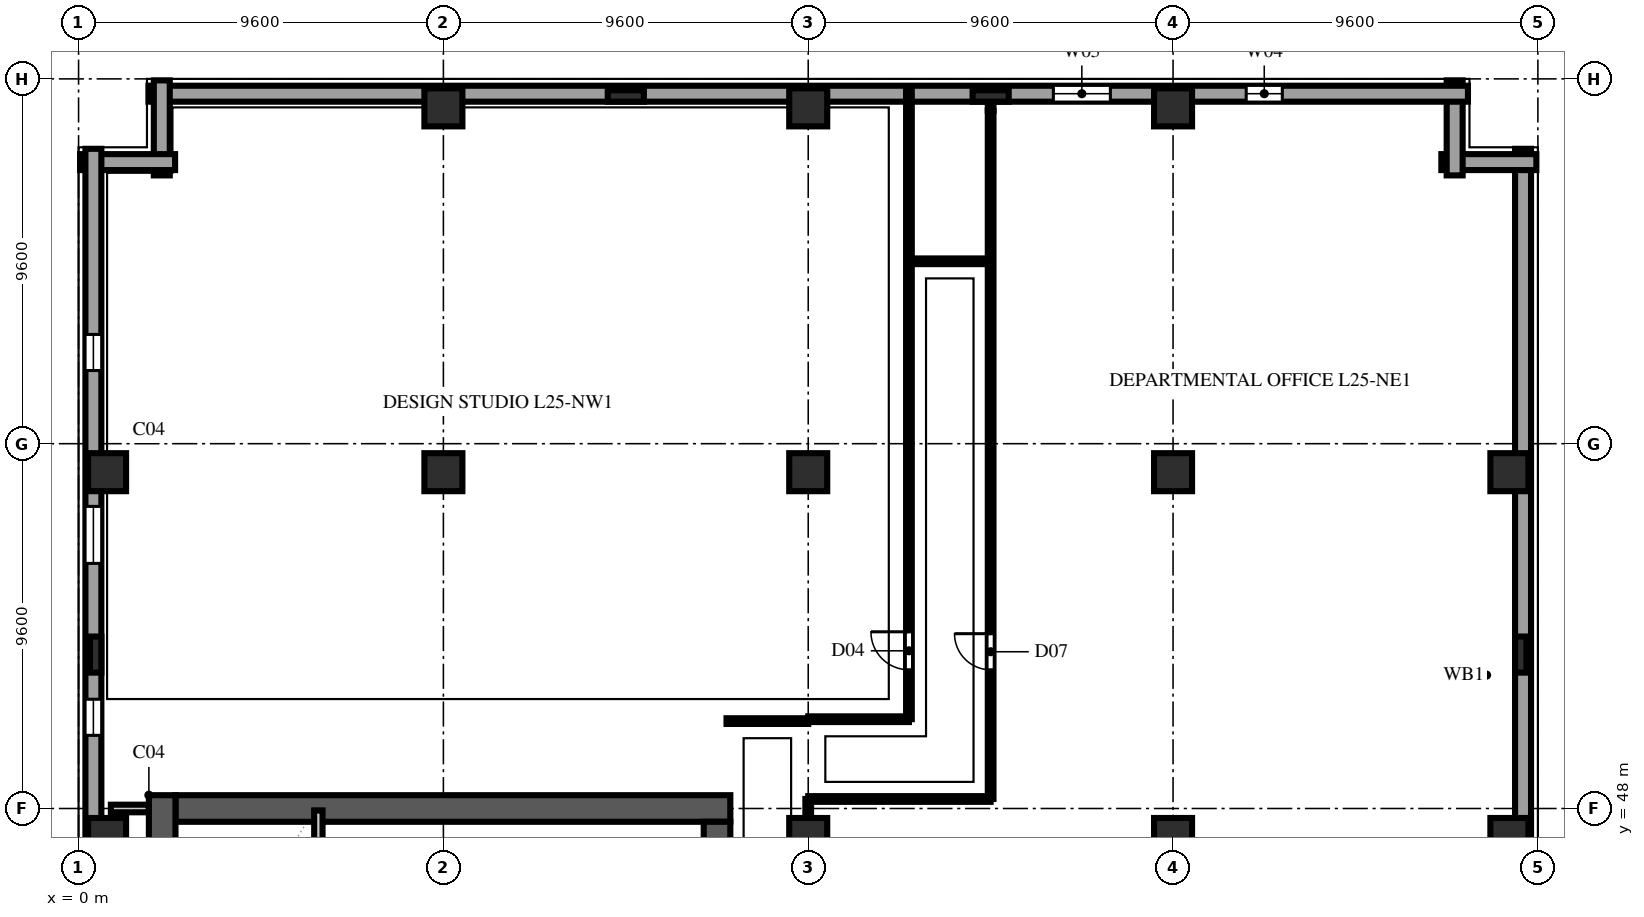
"""IFC4 building model, lengths in metres.
Left out: names, types, materials, properties, quantities, classifications, styles, units other than length and angle.
Written with IfcOpenShell. Run it as: python <this file> out.ifc"""

import sys

from ifc_helpers import new_model, si_unit, direction, frame, frame_2d, origin, origin_2d, place, context, subcontext, project, spatial, rectangle, extrude, element, fill, save


model = new_model("IFC4")
c1 = context("Model", 3, precision=1e-05, world=origin(), true_north=direction((0.0, 1.0)))
c2 = subcontext(c1, "Body", "Model", "MODEL_VIEW")
j1 = project(units=[si_unit("LENGTHUNIT", "METRE"), si_unit("PLANEANGLEUNIT", "RADIAN")], contexts=[c1])
p1 = place(None, origin())
s1 = spatial("IfcSite", under=j1, at=p1, CompositionType="ELEMENT")
p2 = place(p1, origin())
s2 = spatial("IfcBuilding", under=s1, at=p2, CompositionType="ELEMENT")
p3 = place(p2, frame((0.0, 0.0, 101.4)))
s3 = spatial("IfcBuildingStorey", under=s2, at=p3, CompositionType="ELEMENT", Elevation=101.4)
p4 = place(p3, frame((2.55, 48.0, 0.0), z_axis=(0.0, 0.0, 1.0), x_axis=(1.0, 0.0, 0.0)))
e1 = element("IfcWall", 1, at=p4, inside=s3, PredefinedType="SHEAR", context=c2, shape_type="SweptSolid", body=[
    extrude(rectangle(XDim=14.6, YDim=0.7, at=frame_2d((7.3, 0.0))), origin(), (0.0, 0.0, 1.0), 3.54),
])
p5 = place(p3, frame((2.2, 9.25, 0.0), z_axis=(0.0, 0.0, 1.0), x_axis=(0.0, 1.0, 0.0)))
e2 = element("IfcWall", 2, at=p5, inside=s3, PredefinedType="SHEAR", context=c2, shape_type="SweptSolid", body=[
    extrude(rectangle(XDim=39.1, YDim=0.7, at=frame_2d((19.55, 0.0))), origin(), (0.0, 0.0, 1.0), 3.54),
])
p6 = place(p3, frame((16.8, 36.4, 0.0), z_axis=(0.0, 0.0, 1.0), x_axis=(0.0, 1.0, 0.0)))
e3 = element("IfcWall", 3, at=p6, inside=s3, PredefinedType="SHEAR", context=c2, shape_type="SweptSolid", body=[
    extrude(rectangle(XDim=11.25, YDim=0.7, at=frame_2d((5.625, 0.0))), origin(), (0.0, 0.0, 1.0), 3.54),
])
p7 = place(p6, frame((9.2, 0.0, 0.0)))
e4 = element("IfcOpeningElement", 4, at=p7, cuts=e3, PredefinedType="OPENING", context=c2, shape_type="SweptSolid", body=[
    extrude(rectangle(XDim=0.95, YDim=2.15, at=frame_2d((0.475, 1.075))), frame((0.0, 0.362, 0.0), z_axis=(0.0, -1.0, 0.0), x_axis=(1.0, 0.0, 0.0)), (0.0, 0.0, 1.0), 0.724),
])
for number, where, z_axis, x_axis in (
    (5, (0.75, 47.25, 0.0), (0.0, 0.0, 1.0), (1.0, 0.0, 0.0)),
    (6, (0.75, 56.85, 0.0), (0.0, 0.0, 1.0), (1.0, 0.0, 0.0)),
    (7, (9.6, 56.85, 0.0), (0.0, 0.0, 1.0), (1.0, 0.0, 0.0)),
    (8, (9.6, 66.45, 0.0), (0.0, 0.0, 1.0), (1.0, 0.0, 0.0)),
    (9, (19.2, 47.25, 0.0), (0.0, 0.0, 1.0), (1.0, 0.0, 0.0)),
    (10, (19.2, 56.85, 0.0), (0.0, 0.0, 1.0), (1.0, 0.0, 0.0)),
    (11, (19.2, 66.45, 0.0), (0.0, 0.0, 1.0), (1.0, 0.0, 0.0)),
    (12, (28.8, 47.25, 0.0), (0.0, 0.0, 1.0), (1.0, 0.0, 0.0)),
    (13, (28.8, 56.85, 0.0), (0.0, 0.0, 1.0), (1.0, 0.0, 0.0)),
    (14, (28.8, 66.45, 0.0), (0.0, 0.0, 1.0), (1.0, 0.0, 0.0)),
    (15, (37.65, 47.25, 0.0), (0.0, 0.0, 1.0), (1.0, 0.0, 0.0)),
    (16, (37.65, 56.85, 0.0), (0.0, 0.0, 1.0), (1.0, 0.0, 0.0)),
):
    element("IfcColumn", number, at=place(p3, frame(where, z_axis=z_axis, x_axis=x_axis)), inside=s3, PredefinedType="COLUMN", context=c2, shape_type="SweptSolid", body=[
        extrude(rectangle(XDim=1.0, YDim=1.0, at=origin_2d()), origin(), (0.0, 0.0, 1.0), 3.8),
    ])
for number, where, z_axis, x_axis in (
    (17, (0.45, 52.05, 0.0), (0.0, 0.0, 1.0), (0.0, 1.0, 0.0)),
    (18, (14.4, 66.75, 0.0), (0.0, 0.0, 1.0), (1.0, 0.0, 0.0)),
    (19, (24.0, 66.75, 0.0), (0.0, 0.0, 1.0), (1.0, 0.0, 0.0)),
    (20, (37.95, 52.05, 0.0), (0.0, 0.0, 1.0), (0.0, 1.0, 0.0)),
):
    element("IfcColumn", number, at=place(p3, frame(where, z_axis=z_axis, x_axis=x_axis)), inside=s3, PredefinedType="PILASTER", context=c2, shape_type="SweptSolid", body=[
        extrude(rectangle(XDim=0.95, YDim=0.3, at=origin_2d()), origin(), (0.0, 0.0, 1.0), 3.8),
    ])
p8 = place(p3, frame((38.01, 37.66, 0.0), z_axis=(0.0, 0.0, 1.0), x_axis=(0.0, 1.0, 0.0)))
e21 = element("IfcWall", 21, at=p8, inside=s3, PredefinedType="SOLIDWALL", context=c2, shape_type="SweptSolid", body=[
    extrude(rectangle(XDim=27.7, YDim=0.42, at=frame_2d((13.85, 0.0))), origin(), (0.0, 0.0, 1.0), 3.54),
])
for number, where, z_axis, x_axis in (
    (22, (38.36, 65.01, 0.0), (0.0, 0.0, 1.0), (-1.0, 0.0, 0.0)),
    (23, (36.21, 64.66, 0.0), (0.0, 0.0, 1.0), (0.0, 1.0, 0.0)),
):
    element("IfcWall", number, at=place(p3, frame(where, z_axis=z_axis, x_axis=x_axis)), inside=s3, PredefinedType="SOLIDWALL", context=c2, shape_type="SweptSolid", body=[
        extrude(rectangle(XDim=2.5, YDim=0.42, at=frame_2d((1.25, 0.0))), origin(), (0.0, 0.0, 1.0), 3.54),
    ])
p9 = place(p3, frame((36.56, 66.81, 0.0), z_axis=(0.0, 0.0, 1.0), x_axis=(-1.0, 0.0, 0.0)))
e24 = element("IfcWall", 24, at=p9, inside=s3, PredefinedType="SOLIDWALL", context=c2, shape_type="SweptSolid", body=[
    extrude(rectangle(XDim=34.72, YDim=0.42, at=frame_2d((17.36, 0.0))), origin(), (0.0, 0.0, 1.0), 3.54),
])
p10 = place(p9, frame((4.885, 0.0, 0.9)))
e25 = element("IfcOpeningElement", 25, at=p10, cuts=e24, PredefinedType="OPENING", context=c2, shape_type="SweptSolid", body=[
    extrude(rectangle(XDim=0.95, YDim=1.85, at=frame_2d((0.475, 0.925))), frame((0.0, 0.222, 0.0), z_axis=(0.0, -1.0, 0.0), x_axis=(1.0, 0.0, 0.0)), (0.0, 0.0, 1.0), 0.444),
])
p11 = place(p9, frame((9.41, 0.0, 0.9)))
e26 = element("IfcOpeningElement", 26, at=p11, cuts=e24, PredefinedType="OPENING", context=c2, shape_type="SweptSolid", body=[
    extrude(rectangle(XDim=1.5, YDim=1.85, at=frame_2d((0.75, 0.925))), frame((0.0, 0.222, 0.0), z_axis=(0.0, -1.0, 0.0), x_axis=(1.0, 0.0, 0.0)), (0.0, 0.0, 1.0), 0.444),
])
for number, where, z_axis, x_axis in (
    (27, (2.19, 67.16, 0.0), (0.0, 0.0, 1.0), (0.0, -1.0, 0.0)),
    (28, (2.54, 65.01, 0.0), (0.0, 0.0, 1.0), (-1.0, 0.0, 0.0)),
):
    element("IfcWall", number, at=place(p3, frame(where, z_axis=z_axis, x_axis=x_axis)), inside=s3, PredefinedType="SOLIDWALL", context=c2, shape_type="SweptSolid", body=[
        extrude(rectangle(XDim=2.5, YDim=0.42, at=frame_2d((1.25, 0.0))), origin(), (0.0, 0.0, 1.0), 3.54),
    ])
p12 = place(p3, frame((0.39, 65.36, 0.0), z_axis=(0.0, 0.0, 1.0), x_axis=(0.0, -1.0, 0.0)))
e29 = element("IfcWall", 29, at=p12, inside=s3, PredefinedType="SOLIDWALL", context=c2, shape_type="SweptSolid", body=[
    extrude(rectangle(XDim=63.52, YDim=0.42, at=frame_2d((31.76, 0.0))), origin(), (0.0, 0.0, 1.0), 3.54),
])
p13 = place(p12, frame((4.885, 0.0, 0.9)))
e30 = element("IfcOpeningElement", 30, at=p13, cuts=e29, PredefinedType="OPENING", context=c2, shape_type="SweptSolid", body=[
    extrude(rectangle(XDim=0.95, YDim=1.85, at=frame_2d((0.475, 0.925))), frame((0.0, 0.222, 0.0), z_axis=(0.0, -1.0, 0.0), x_axis=(1.0, 0.0, 0.0)), (0.0, 0.0, 1.0), 0.444),
])
p14 = place(p12, frame((9.41, 0.0, 0.9)))
e31 = element("IfcOpeningElement", 31, at=p14, cuts=e29, PredefinedType="OPENING", context=c2, shape_type="SweptSolid", body=[
    extrude(rectangle(XDim=1.5, YDim=1.85, at=frame_2d((0.75, 0.925))), frame((0.0, 0.222, 0.0), z_axis=(0.0, -1.0, 0.0), x_axis=(1.0, 0.0, 0.0)), (0.0, 0.0, 1.0), 0.444),
])
p15 = place(p12, frame((14.485, 0.0, 0.9)))
e32 = element("IfcOpeningElement", 32, at=p15, cuts=e29, PredefinedType="OPENING", context=c2, shape_type="SweptSolid", body=[
    extrude(rectangle(XDim=0.95, YDim=1.85, at=frame_2d((0.475, 0.925))), frame((0.0, 0.222, 0.0), z_axis=(0.0, -1.0, 0.0), x_axis=(1.0, 0.0, 0.0)), (0.0, 0.0, 1.0), 0.444),
])
p16 = place(p12, frame((19.01, 0.0, 0.9)))
e33 = element("IfcOpeningElement", 33, at=p16, cuts=e29, PredefinedType="OPENING", context=c2, shape_type="SweptSolid", body=[
    extrude(rectangle(XDim=1.5, YDim=1.85, at=frame_2d((0.75, 0.925))), frame((0.0, 0.222, 0.0), z_axis=(0.0, -1.0, 0.0), x_axis=(1.0, 0.0, 0.0)), (0.0, 0.0, 1.0), 0.444),
])
p17 = place(p12, frame((24.085, 0.0, 0.9)))
e34 = element("IfcOpeningElement", 34, at=p17, cuts=e29, PredefinedType="OPENING", context=c2, shape_type="SweptSolid", body=[
    extrude(rectangle(XDim=0.95, YDim=1.85, at=frame_2d((0.475, 0.925))), frame((0.0, 0.222, 0.0), z_axis=(0.0, -1.0, 0.0), x_axis=(1.0, 0.0, 0.0)), (0.0, 0.0, 1.0), 0.444),
])
p18 = place(p12, frame((28.61, 0.0, 0.9)))
e35 = element("IfcOpeningElement", 35, at=p18, cuts=e29, PredefinedType="OPENING", context=c2, shape_type="SweptSolid", body=[
    extrude(rectangle(XDim=1.5, YDim=1.85, at=frame_2d((0.75, 0.925))), frame((0.0, 0.222, 0.0), z_axis=(0.0, -1.0, 0.0), x_axis=(1.0, 0.0, 0.0)), (0.0, 0.0, 1.0), 0.444),
])
p19 = place(p12, frame((33.685, 0.0, 0.9)))
e36 = element("IfcOpeningElement", 36, at=p19, cuts=e29, PredefinedType="OPENING", context=c2, shape_type="SweptSolid", body=[
    extrude(rectangle(XDim=0.95, YDim=1.85, at=frame_2d((0.475, 0.925))), frame((0.0, 0.222, 0.0), z_axis=(0.0, -1.0, 0.0), x_axis=(1.0, 0.0, 0.0)), (0.0, 0.0, 1.0), 0.444),
])
p20 = place(p12, frame((38.21, 0.0, 0.9)))
e37 = element("IfcOpeningElement", 37, at=p20, cuts=e29, PredefinedType="OPENING", context=c2, shape_type="SweptSolid", body=[
    extrude(rectangle(XDim=1.5, YDim=1.85, at=frame_2d((0.75, 0.925))), frame((0.0, 0.222, 0.0), z_axis=(0.0, -1.0, 0.0), x_axis=(1.0, 0.0, 0.0)), (0.0, 0.0, 1.0), 0.444),
])
p21 = place(p12, frame((43.285, 0.0, 0.9)))
e38 = element("IfcOpeningElement", 38, at=p21, cuts=e29, PredefinedType="OPENING", context=c2, shape_type="SweptSolid", body=[
    extrude(rectangle(XDim=0.95, YDim=1.85, at=frame_2d((0.475, 0.925))), frame((0.0, 0.222, 0.0), z_axis=(0.0, -1.0, 0.0), x_axis=(1.0, 0.0, 0.0)), (0.0, 0.0, 1.0), 0.444),
])
p22 = place(p12, frame((47.81, 0.0, 0.9)))
e39 = element("IfcOpeningElement", 39, at=p22, cuts=e29, PredefinedType="OPENING", context=c2, shape_type="SweptSolid", body=[
    extrude(rectangle(XDim=1.5, YDim=1.85, at=frame_2d((0.75, 0.925))), frame((0.0, 0.222, 0.0), z_axis=(0.0, -1.0, 0.0), x_axis=(1.0, 0.0, 0.0)), (0.0, 0.0, 1.0), 0.444),
])
p23 = place(p12, frame((52.885, 0.0, 0.9)))
e40 = element("IfcOpeningElement", 40, at=p23, cuts=e29, PredefinedType="OPENING", context=c2, shape_type="SweptSolid", body=[
    extrude(rectangle(XDim=0.95, YDim=1.85, at=frame_2d((0.475, 0.925))), frame((0.0, 0.222, 0.0), z_axis=(0.0, -1.0, 0.0), x_axis=(1.0, 0.0, 0.0)), (0.0, 0.0, 1.0), 0.444),
])
p24 = place(p12, frame((57.41, 0.0, 0.9)))
e41 = element("IfcOpeningElement", 41, at=p24, cuts=e29, PredefinedType="OPENING", context=c2, shape_type="SweptSolid", body=[
    extrude(rectangle(XDim=1.5, YDim=1.85, at=frame_2d((0.75, 0.925))), frame((0.0, 0.222, 0.0), z_axis=(0.0, -1.0, 0.0), x_axis=(1.0, 0.0, 0.0)), (0.0, 0.0, 1.0), 0.444),
])
p25 = place(p3, frame((6.31, 40.14, 0.0), z_axis=(0.0, 0.0, 1.0), x_axis=(0.0, 1.0, 0.0)))
e42 = element("IfcWall", 42, at=p25, inside=s3, PredefinedType="SOLIDWALL", context=c2, shape_type="SweptSolid", body=[
    extrude(rectangle(XDim=7.81, YDim=0.22, at=frame_2d((3.905, 0.0))), origin(), (0.0, 0.0, 1.0), 3.54),
])
p26 = place(p3, frame((0.85, 48.0, 0.0), z_axis=(0.0, 0.0, 1.0), x_axis=(1.0, 0.0, 0.0)))
e43 = element("IfcWall", 43, at=p26, inside=s3, PredefinedType="SOLIDWALL", context=c2, shape_type="SweptSolid", body=[
    extrude(rectangle(XDim=0.995, YDim=0.2, at=frame_2d((0.498, 0.0))), origin(), (0.0, 0.0, 1.0), 3.54),
])
p27 = place(p3, frame((17.05, 50.3, 0.0), z_axis=(0.0, 0.0, 1.0), x_axis=(1.0, 0.0, 0.0)))
e44 = element("IfcWall", 44, at=p27, inside=s3, PredefinedType="PARTITIONING", context=c2, shape_type="SweptSolid", body=[
    extrude(rectangle(XDim=2.15, YDim=0.15, at=frame_2d((1.075, 0.0))), origin(), (0.0, 0.0, 1.0), 3.54),
])
p28 = place(p3, frame((19.2, 23.45, 0.0), z_axis=(0.0, 0.0, 1.0), x_axis=(0.0, 1.0, 0.0)))
e45 = element("IfcWall", 45, at=p28, inside=s3, PredefinedType="PARTITIONING", context=c2, shape_type="SweptSolid", body=[
    extrude(rectangle(XDim=24.8, YDim=0.15, at=frame_2d((12.4, 0.0))), origin(), (0.0, 0.0, 1.0), 3.123),
])
p29 = place(p28, frame((9.35, 0.0, 0.0)))
e46 = element("IfcOpeningElement", 46, at=p29, cuts=e45, PredefinedType="OPENING", context=c2, shape_type="SweptSolid", body=[
    extrude(rectangle(XDim=0.95, YDim=2.15, at=frame_2d((0.475, 1.075))), frame((0.0, 0.087, 0.0), z_axis=(0.0, -1.0, 0.0), x_axis=(1.0, 0.0, 0.0)), (0.0, 0.0, 1.0), 0.174),
])
p30 = place(p3, frame((19.2, 48.25, 0.0), z_axis=(0.0, 0.0, 1.0), x_axis=(1.0, 0.0, 0.0)))
e47 = element("IfcWall", 47, at=p30, inside=s3, PredefinedType="PARTITIONING", context=c2, shape_type="SweptSolid", body=[
    extrude(rectangle(XDim=4.8, YDim=0.15, at=frame_2d((2.4, 0.0))), origin(), (0.0, 0.0, 1.0), 3.54),
])
p31 = place(p3, frame((19.2, 50.35, 0.0), z_axis=(0.0, 0.0, 1.0), x_axis=(1.0, 0.0, 0.0)))
e48 = element("IfcWall", 48, at=p31, inside=s3, PredefinedType="PARTITIONING", context=c2, shape_type="SweptSolid", body=[
    extrude(rectangle(XDim=2.65, YDim=0.15, at=frame_2d((1.325, 0.0))), origin(), (0.0, 0.0, 1.0), 3.54),
])
p32 = place(p3, frame((21.85, 62.4, 0.0), z_axis=(0.0, 0.0, 1.0), x_axis=(1.0, 0.0, 0.0)))
e49 = element("IfcWall", 49, at=p32, inside=s3, PredefinedType="PARTITIONING", context=c2, shape_type="SweptSolid", body=[
    extrude(rectangle(XDim=2.15, YDim=0.15, at=frame_2d((1.075, 0.0))), origin(), (0.0, 0.0, 1.0), 3.54),
])
p33 = place(p3, frame((24.0, 48.25, 0.0), z_axis=(0.0, 0.0, 1.0), x_axis=(0.0, 1.0, 0.0)))
e50 = element("IfcWall", 50, at=p33, inside=s3, PredefinedType="PARTITIONING", context=c2, shape_type="SweptSolid", body=[
    extrude(rectangle(XDim=18.11, YDim=0.15, at=frame_2d((9.055, 0.0))), origin(), (0.0, 0.0, 1.0), 3.133),
])
p34 = place(p33, frame((3.4, 0.0, 0.0)))
e51 = element("IfcOpeningElement", 51, at=p34, cuts=e50, PredefinedType="OPENING", context=c2, shape_type="SweptSolid", body=[
    extrude(rectangle(XDim=0.95, YDim=2.15, at=frame_2d((0.475, 1.075))), frame((0.0, 0.087, 0.0), z_axis=(0.0, -1.0, 0.0), x_axis=(1.0, 0.0, 0.0)), (0.0, 0.0, 1.0), 0.174),
])
p35 = place(p3, frame((24.0, 66.36, 0.0), z_axis=(0.0, 0.0, 1.0), x_axis=(0.0, 1.0, 0.0)))
e52 = element("IfcWall", 52, at=p35, inside=s3, PredefinedType="PARTITIONING", context=c2, shape_type="SweptSolid", body=[
    extrude(rectangle(XDim=0.62, YDim=0.15, at=frame_2d((0.31, 0.0))), origin(), (0.0, 0.0, 1.0), 3.54),
])
p36 = place(p3, frame((21.85, 50.35, 0.0), z_axis=(0.0, 0.0, 1.0), x_axis=(0.0, 1.0, 0.0)))
e53 = element("IfcWall", 53, at=p36, inside=s3, PredefinedType="PARTITIONING", context=c2, shape_type="SweptSolid", body=[
    extrude(rectangle(XDim=16.63, YDim=0.15, at=frame_2d((8.315, 0.0))), origin(), (0.0, 0.0, 1.0), 3.54),
])
p37 = place(p36, frame((1.3, 0.0, 0.0)))
e54 = element("IfcOpeningElement", 54, at=p37, cuts=e53, PredefinedType="OPENING", context=c2, shape_type="SweptSolid", body=[
    extrude(rectangle(XDim=1.0, YDim=2.2, at=frame_2d((0.5, 1.1))), frame((0.0, 0.087, 0.0), z_axis=(0.0, -1.0, 0.0), x_axis=(1.0, 0.0, 0.0)), (0.0, 0.0, 1.0), 0.174),
])
p38 = place(p10, origin())
e55 = element("IfcWindow", 55, at=p38, inside=s3, PartitioningType="SINGLE_PANEL", PredefinedType="WINDOW", context=c2, shape_type="SweptSolid", body=[
    extrude(rectangle(XDim=0.95, YDim=1.85, at=frame_2d((0.475, 0.925))), frame((0.0, 0.11, 0.0), z_axis=(0.0, -1.0, 0.0), x_axis=(1.0, 0.0, 0.0)), (0.0, 0.0, 1.0), 0.06),
])
fill(e25, e55)
p39 = place(p11, origin())
e56 = element("IfcWindow", 56, at=p39, inside=s3, PartitioningType="DOUBLE_PANEL_VERTICAL", PredefinedType="WINDOW", context=c2, shape_type="SweptSolid", body=[
    extrude(rectangle(XDim=1.5, YDim=1.85, at=frame_2d((0.75, 0.925))), frame((0.0, 0.11, 0.0), z_axis=(0.0, -1.0, 0.0), x_axis=(1.0, 0.0, 0.0)), (0.0, 0.0, 1.0), 0.06),
])
fill(e26, e56)
p40 = place(p13, origin())
e57 = element("IfcWindow", 57, at=p40, inside=s3, PartitioningType="SINGLE_PANEL", PredefinedType="WINDOW", context=c2, shape_type="SweptSolid", body=[
    extrude(rectangle(XDim=0.95, YDim=1.85, at=frame_2d((0.475, 0.925))), frame((0.0, 0.11, 0.0), z_axis=(0.0, -1.0, 0.0), x_axis=(1.0, 0.0, 0.0)), (0.0, 0.0, 1.0), 0.06),
])
fill(e30, e57)
p41 = place(p14, origin())
e58 = element("IfcWindow", 58, at=p41, inside=s3, PartitioningType="DOUBLE_PANEL_VERTICAL", PredefinedType="WINDOW", context=c2, shape_type="SweptSolid", body=[
    extrude(rectangle(XDim=1.5, YDim=1.85, at=frame_2d((0.75, 0.925))), frame((0.0, 0.11, 0.0), z_axis=(0.0, -1.0, 0.0), x_axis=(1.0, 0.0, 0.0)), (0.0, 0.0, 1.0), 0.06),
])
fill(e31, e58)
p42 = place(p15, origin())
e59 = element("IfcWindow", 59, at=p42, inside=s3, PartitioningType="SINGLE_PANEL", PredefinedType="WINDOW", context=c2, shape_type="SweptSolid", body=[
    extrude(rectangle(XDim=0.95, YDim=1.85, at=frame_2d((0.475, 0.925))), frame((0.0, 0.11, 0.0), z_axis=(0.0, -1.0, 0.0), x_axis=(1.0, 0.0, 0.0)), (0.0, 0.0, 1.0), 0.06),
])
fill(e32, e59)
p43 = place(p34, origin())
e60 = element("IfcDoor", 60, at=p43, inside=s3, OperationType="SINGLE_SWING_RIGHT", PredefinedType="DOOR", context=c2, shape_type="SweptSolid", body=[
    extrude(rectangle(XDim=0.95, YDim=2.15, at=frame_2d((0.475, 1.075))), frame((0.0, 0.025, 0.0), z_axis=(0.0, -1.0, 0.0), x_axis=(1.0, 0.0, 0.0)), (0.0, 0.0, 1.0), 0.05),
])
fill(e51, e60)
p44 = place(p37, origin())
e61 = element("IfcDoor", 61, at=p44, inside=s3, OperationType="SINGLE_SWING_RIGHT", PredefinedType="DOOR", context=c2, shape_type="SweptSolid", body=[
    extrude(rectangle(XDim=1.0, YDim=2.2, at=frame_2d((0.5, 1.1))), frame((0.0, 0.025, 0.0), z_axis=(0.0, -1.0, 0.0), x_axis=(1.0, 0.0, 0.0)), (0.0, 0.0, 1.0), 0.05),
])
fill(e54, e61)
save(model, sys.argv[1])
